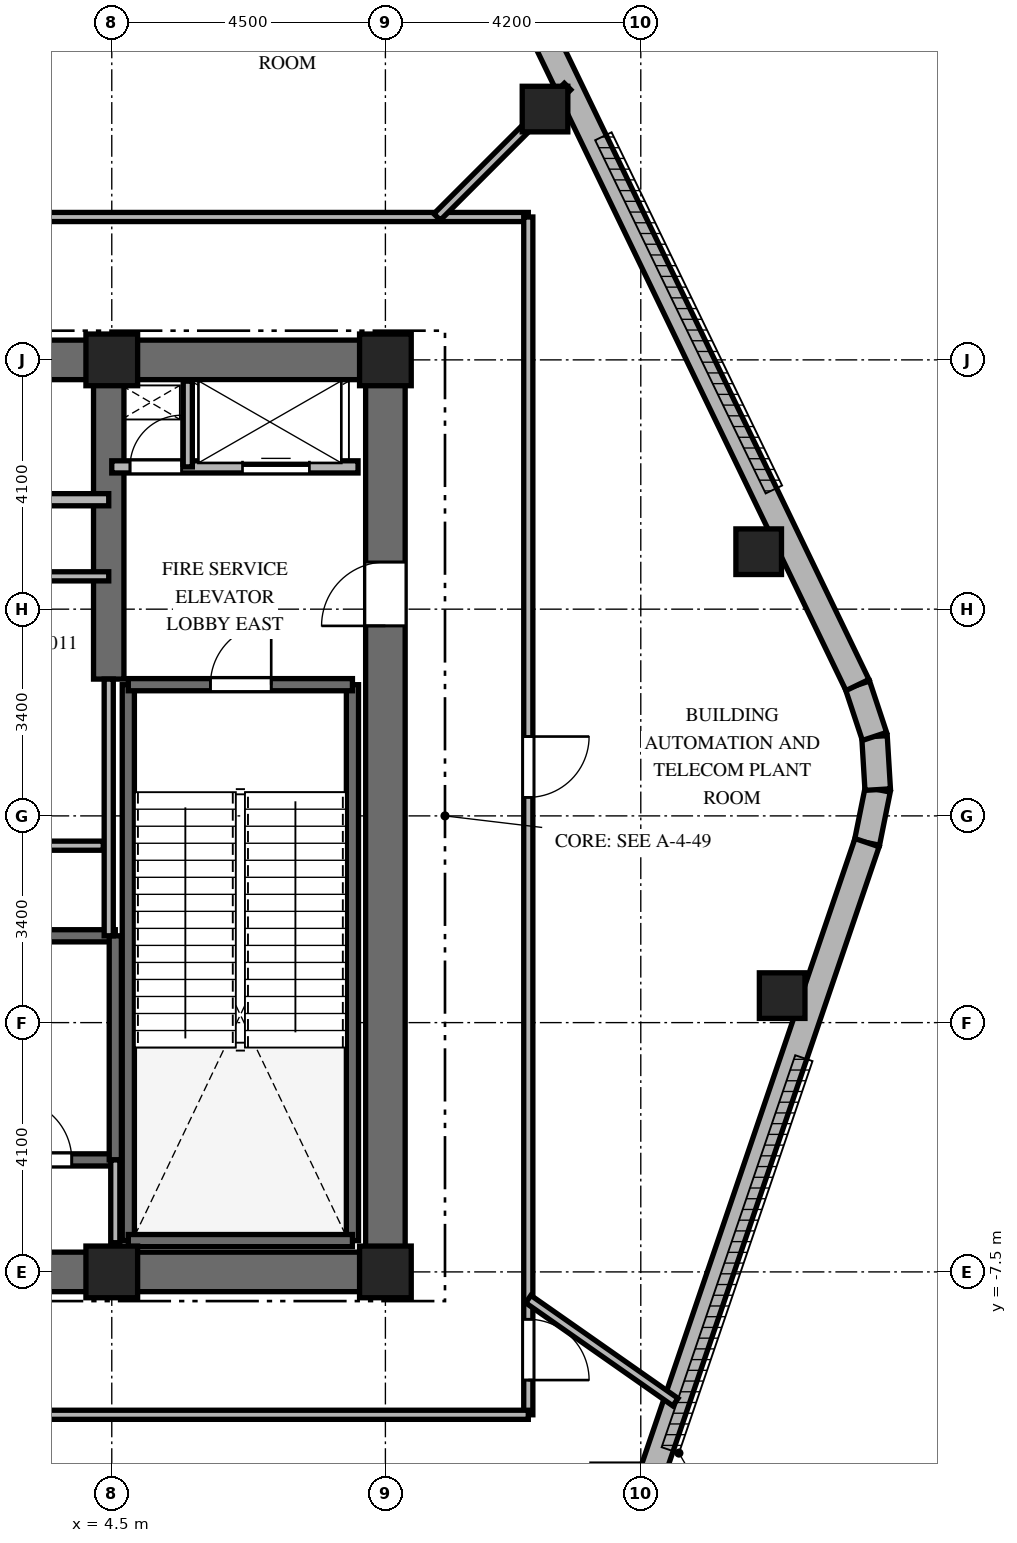
"""IFC4 building model, lengths in metres.
Left out: names, types, materials, properties, quantities, classifications, styles, units other than length and angle.
Written with IfcOpenShell. Run it as: python <this file> out.ifc"""

import sys

from ifc_helpers import new_model, si_unit, direction, frame, frame_2d, origin, origin_2d, place, context, subcontext, project, spatial, rectangle, extrude, element, fill, save


model = new_model("IFC4")
c1 = context("Model", 3, precision=1e-05, world=origin(), true_north=direction((0.0, 1.0)))
c2 = subcontext(c1, "Body", "Model", "MODEL_VIEW")
j1 = project(units=[si_unit("LENGTHUNIT", "METRE"), si_unit("PLANEANGLEUNIT", "RADIAN")], contexts=[c1])
p1 = place(None, origin())
s1 = spatial("IfcSite", under=j1, at=p1, CompositionType="ELEMENT")
p2 = place(p1, origin())
s2 = spatial("IfcBuilding", under=s1, at=p2, CompositionType="ELEMENT")
p3 = place(p2, frame((0.0, 0.0, 310.4)))
s3 = spatial("IfcBuildingStorey", under=s2, at=p3, CompositionType="ELEMENT", Elevation=310.4)
p4 = place(p3, frame((-9.325, -7.5, 0.0), z_axis=(0.0, 0.0, 1.0), x_axis=(1.0, 0.0, 0.0)))
e1 = element("IfcWall", 1, at=p4, inside=s3, PredefinedType="SHEAR", context=c2, shape_type="SweptSolid", body=[
    extrude(rectangle(XDim=18.65, YDim=0.65, at=frame_2d((9.325, 0.0))), origin(), (0.0, 0.0, 1.0), 5.5),
])
p5 = place(p4, frame((9.375, 0.0, 0.0)))
e2 = element("IfcOpeningElement", 2, at=p5, cuts=e1, PredefinedType="OPENING", context=c2, shape_type="SweptSolid", body=[
    extrude(rectangle(XDim=1.0, YDim=2.15, at=frame_2d((0.5, 1.075))), frame((0.0, 0.335, 0.0), z_axis=(0.0, -1.0, 0.0), x_axis=(1.0, 0.0, 0.0)), (0.0, 0.0, 1.0), 0.67),
])
p6 = place(p3, frame((1.85, 7.5, 0.0), z_axis=(0.0, 0.0, 1.0), x_axis=(1.0, 0.0, 0.0)))
e3 = element("IfcWall", 3, at=p6, inside=s3, PredefinedType="SHEAR", context=c2, shape_type="SweptSolid", body=[
    extrude(rectangle(XDim=7.475, YDim=0.65, at=frame_2d((3.737, 0.0))), origin(), (0.0, 0.0, 1.0), 5.5),
])
p7 = place(p3, frame((9.0, -7.175, 0.0), z_axis=(0.0, 0.0, 1.0), x_axis=(0.0, 1.0, 0.0)))
e4 = element("IfcWall", 4, at=p7, inside=s3, PredefinedType="SHEAR", context=c2, shape_type="SweptSolid", body=[
    extrude(rectangle(XDim=14.35, YDim=0.65, at=frame_2d((7.175, 0.0))), origin(), (0.0, 0.0, 1.0), 5.5),
])
p8 = place(p7, frame((10.3, 0.0, 0.0)))
e5 = element("IfcOpeningElement", 5, at=p8, cuts=e4, PredefinedType="OPENING", context=c2, shape_type="SweptSolid", body=[
    extrude(rectangle(XDim=1.05, YDim=2.15, at=frame_2d((0.525, 1.075))), frame((0.0, 0.335, 0.0), z_axis=(0.0, -1.0, 0.0), x_axis=(1.0, 0.0, 0.0)), (0.0, 0.0, 1.0), 0.67),
])
p9 = place(p3, frame((4.45, 2.25, 0.0), z_axis=(0.0, 0.0, 1.0), x_axis=(0.0, 1.0, 0.0)))
e6 = element("IfcWall", 6, at=p9, inside=s3, PredefinedType="SHEAR", context=c2, shape_type="SweptSolid", body=[
    extrude(rectangle(XDim=4.925, YDim=0.5, at=frame_2d((2.462, 0.0))), origin(), (0.0, 0.0, 1.0), 5.5),
])
for number, where, z_axis, x_axis in (
    (7, (4.772, -6.985, 0.0), (0.0, 0.0, 1.0), (0.0, 1.0, 0.0)),
    (8, (8.458, -6.985, 0.0), (0.0, 0.0, 1.0), (0.0, 1.0, 0.0)),
):
    element("IfcWall", number, at=place(p3, frame(where, z_axis=z_axis, x_axis=x_axis)), inside=s3, PredefinedType="SHEAR", context=c2, shape_type="SweptSolid", body=[
        extrude(rectangle(XDim=9.143, YDim=0.2, at=frame_2d((4.572, 0.0))), origin(), (0.0, 0.0, 1.0), 5.5),
    ])
p10 = place(p3, frame((4.772, -6.985, 0.0), z_axis=(0.0, 0.0, 1.0), x_axis=(1.0, 0.0, 0.0)))
e9 = element("IfcWall", 9, at=p10, inside=s3, PredefinedType="SHEAR", context=c2, shape_type="SweptSolid", body=[
    extrude(rectangle(XDim=3.686, YDim=0.2, at=frame_2d((1.843, 0.0))), origin(), (0.0, 0.0, 1.0), 5.5),
])
p11 = place(p3, frame((4.772, 2.158, 0.0), z_axis=(0.0, 0.0, 1.0), x_axis=(1.0, 0.0, 0.0)))
e10 = element("IfcWall", 10, at=p11, inside=s3, PredefinedType="SHEAR", context=c2, shape_type="SweptSolid", body=[
    extrude(rectangle(XDim=3.686, YDim=0.2, at=frame_2d((1.843, 0.0))), origin(), (0.0, 0.0, 1.0), 5.5),
])
p12 = place(p11, frame((1.35, 0.0, 0.0)))
e11 = element("IfcOpeningElement", 11, at=p12, cuts=e10, PredefinedType="OPENING", context=c2, shape_type="SweptSolid", body=[
    extrude(rectangle(XDim=1.0, YDim=2.15, at=frame_2d((0.5, 1.075))), frame((0.0, 0.11, 0.0), z_axis=(0.0, -1.0, 0.0), x_axis=(1.0, 0.0, 0.0)), (0.0, 0.0, 1.0), 0.22),
])
p13 = place(p3, frame((-4.608, -5.658, 0.0), z_axis=(0.0, 0.0, 1.0), x_axis=(1.0, 0.0, 0.0)))
e12 = element("IfcWall", 12, at=p13, inside=s3, PredefinedType="SHEAR", context=c2, shape_type="SweptSolid", body=[
    extrude(rectangle(XDim=9.166, YDim=0.2, at=frame_2d((4.583, 0.0))), origin(), (0.0, 0.0, 1.0), 5.5),
])
p14 = place(p13, frame((7.45, 0.0, 0.0)))
e13 = element("IfcOpeningElement", 13, at=p14, cuts=e12, PredefinedType="OPENING", context=c2, shape_type="SweptSolid", body=[
    extrude(rectangle(XDim=1.0, YDim=2.15, at=frame_2d((0.5, 1.075))), frame((0.0, 0.11, 0.0), z_axis=(0.0, -1.0, 0.0), x_axis=(1.0, 0.0, 0.0)), (0.0, 0.0, 1.0), 0.22),
])
p15 = place(p3, frame((-4.608, -1.972, 0.0), z_axis=(0.0, 0.0, 1.0), x_axis=(1.0, 0.0, 0.0)))
e14 = element("IfcWall", 14, at=p15, inside=s3, PredefinedType="SHEAR", context=c2, shape_type="SweptSolid", body=[
    extrude(rectangle(XDim=9.166, YDim=0.2, at=frame_2d((4.583, 0.0))), origin(), (0.0, 0.0, 1.0), 5.5),
])
p16 = place(p3, frame((4.558, -5.658, 0.0), z_axis=(0.0, 0.0, 1.0), x_axis=(0.0, 1.0, 0.0)))
e15 = element("IfcWall", 15, at=p16, inside=s3, PredefinedType="SHEAR", context=c2, shape_type="SweptSolid", body=[
    extrude(rectangle(XDim=3.686, YDim=0.2, at=frame_2d((1.843, 0.0))), origin(), (0.0, 0.0, 1.0), 5.5),
])
for number, where, z_axis, x_axis in (
    (16, (4.5, -7.5, 0.0), (0.0, 0.0, 1.0), (1.0, 0.0, 0.0)),
    (17, (9.0, -7.5, 0.0), (0.0, 0.0, 1.0), (1.0, 0.0, 0.0)),
    (18, (9.0, 7.5, 0.0), (0.0, 0.0, 1.0), (1.0, 0.0, 0.0)),
    (19, (4.5, 7.5, 0.0), (0.0, 0.0, 1.0), (1.0, 0.0, 0.0)),
):
    element("IfcColumn", number, at=place(p3, frame(where, z_axis=z_axis, x_axis=x_axis)), inside=s3, PredefinedType="COLUMN", context=c2, shape_type="SweptSolid", body=[
        extrude(rectangle(XDim=0.85, YDim=0.85, at=origin_2d()), origin(), (0.0, 0.0, 1.0), 5.5),
    ])
for number, where, z_axis, x_axis in (
    (20, (15.525, -2.956, 0.0), (0.0, 0.0, 1.0), (1.0, 0.0, 0.0)),
    (21, (15.139, 4.345, 0.0), (0.0, 0.0, 1.0), (1.0, 0.0, 0.0)),
    (22, (11.625, 11.625, 0.0), (0.0, 0.0, 1.0), (1.0, 0.0, 0.0)),
):
    element("IfcColumn", number, at=place(p3, frame(where, z_axis=z_axis, x_axis=x_axis)), inside=s3, PredefinedType="COLUMN", context=c2, shape_type="SweptSolid", body=[
        extrude(rectangle(XDim=0.75, YDim=0.75, at=origin_2d()), origin(), (0.0, 0.0, 1.0), 5.5),
    ])
p17 = place(p3, frame((16.921, -0.44, 0.0), z_axis=(0.0, 0.0, 1.0), x_axis=(0.197170749138, 0.980369162961, 0.0)))
e23 = element("IfcWall", 23, at=p17, inside=s3, PredefinedType="SOLIDWALL", context=c2, shape_type="SweptSolid", body=[
    extrude(rectangle(XDim=0.89, YDim=0.42, at=frame_2d((0.445, 0.0))), origin(), (0.0, 0.0, 1.0), 5.18),
])
p18 = place(p3, frame((17.096, 0.433, 0.0), z_axis=(0.0, 0.0, 1.0), x_axis=(-0.060469820114, 0.998170026025, 0.0)))
e24 = element("IfcWall", 24, at=p18, inside=s3, PredefinedType="SOLIDWALL", context=c2, shape_type="SweptSolid", body=[
    extrude(rectangle(XDim=0.876, YDim=0.42, at=frame_2d((0.438, 0.0))), origin(), (0.0, 0.0, 1.0), 5.18),
])
p19 = place(p3, frame((17.043, 1.307, 0.0), z_axis=(0.0, 0.0, 1.0), x_axis=(-0.314581701602, 0.949230400386, 0.0)))
e25 = element("IfcWall", 25, at=p19, inside=s3, PredefinedType="SOLIDWALL", context=c2, shape_type="SweptSolid", body=[
    extrude(rectangle(XDim=0.89, YDim=0.42, at=frame_2d((0.445, 0.0))), origin(), (0.0, 0.0, 1.0), 5.18),
])
p20 = place(p3, frame((12.344, -13.873, 0.0), z_axis=(0.0, 0.0, 1.0), x_axis=(0.322553427155, 0.946551259378, 0.0)))
e26 = element("IfcWall", 26, at=p20, inside=s3, PredefinedType="SOLIDWALL", context=c2, shape_type="SweptSolid", body=[
    extrude(rectangle(XDim=14.191, YDim=0.42, at=frame_2d((7.096, 0.0))), origin(), (0.0, 0.0, 1.0), 5.18),
])
p21 = place(p3, frame((16.763, 2.152, 0.0), z_axis=(0.0, 0.0, 1.0), x_axis=(-0.434664735238, 0.900592342817, 0.0)))
e27 = element("IfcWall", 27, at=p21, inside=s3, PredefinedType="SOLIDWALL", context=c2, shape_type="SweptSolid", body=[
    extrude(rectangle(XDim=13.44, YDim=0.42, at=frame_2d((6.72, 0.0))), origin(), (0.0, 0.0, 1.0), 5.18),
])
p22 = place(p3, frame((4.558, -7.02, 0.0), z_axis=(0.0, 0.0, 1.0), x_axis=(0.0, 1.0, 0.0)))
e28 = element("IfcWall", 28, at=p22, inside=s3, PredefinedType="PARTITIONING", context=c2, shape_type="SweptSolid", body=[
    extrude(rectangle(XDim=1.362, YDim=0.15, at=frame_2d((0.681, 0.0))), origin(), (0.0, 0.0, 1.0), 5.18),
])
p23 = place(p3, frame((4.5, 5.74, 0.0), z_axis=(0.0, 0.0, 1.0), x_axis=(1.0, 0.0, 0.0)))
e29 = element("IfcWall", 29, at=p23, inside=s3, PredefinedType="PARTITIONING", context=c2, shape_type="SweptSolid", body=[
    extrude(rectangle(XDim=4.05, YDim=0.2, at=frame_2d((2.025, 0.0))), origin(), (0.0, 0.0, 1.0), 5.18),
])
p24 = place(p23, frame((0.3, 0.0, 0.0)))
e30 = element("IfcOpeningElement", 30, at=p24, cuts=e29, PredefinedType="OPENING", context=c2, shape_type="SweptSolid", body=[
    extrude(rectangle(XDim=0.85, YDim=2.03, at=frame_2d((0.425, 1.015))), frame((0.0, 0.11, 0.0), z_axis=(0.0, -1.0, 0.0), x_axis=(1.0, 0.0, 0.0)), (0.0, 0.0, 1.0), 0.22),
])
p25 = place(p23, frame((2.15, 0.0, 0.0)))
e31 = element("IfcOpeningElement", 31, at=p25, cuts=e29, PredefinedType="OPENING", context=c2, shape_type="SweptSolid", body=[
    extrude(rectangle(XDim=1.1, YDim=2.2, at=frame_2d((0.55, 1.1))), frame((0.0, 0.11, 0.0), z_axis=(0.0, -1.0, 0.0), x_axis=(1.0, 0.0, 0.0)), (0.0, 0.0, 1.0), 0.22),
])
p26 = place(p3, frame((5.75, 5.74, 0.0), z_axis=(0.0, 0.0, 1.0), x_axis=(0.0, 1.0, 0.0)))
e32 = element("IfcWall", 32, at=p26, inside=s3, PredefinedType="PARTITIONING", context=c2, shape_type="SweptSolid", body=[
    extrude(rectangle(XDim=1.41, YDim=0.15, at=frame_2d((0.705, 0.0))), origin(), (0.0, 0.0, 1.0), 5.18),
])
p27 = place(p3, frame((1.85, 5.2, 0.0), z_axis=(0.0, 0.0, 1.0), x_axis=(1.0, 0.0, 0.0)))
e33 = element("IfcWall", 33, at=p27, inside=s3, PredefinedType="PARTITIONING", context=c2, shape_type="SweptSolid", body=[
    extrude(rectangle(XDim=2.6, YDim=0.2, at=frame_2d((1.3, 0.0))), origin(), (0.0, 0.0, 1.0), 5.18),
])
p28 = place(p3, frame((4.45, -1.972, 0.0), z_axis=(0.0, 0.0, 1.0), x_axis=(0.0, 1.0, 0.0)))
e34 = element("IfcWall", 34, at=p28, inside=s3, PredefinedType="PARTITIONING", context=c2, shape_type="SweptSolid", body=[
    extrude(rectangle(XDim=4.222, YDim=0.15, at=frame_2d((2.111, 0.0))), origin(), (0.0, 0.0, 1.0), 5.18),
])
p29 = place(p3, frame((1.9, 3.94, 0.0), z_axis=(0.0, 0.0, 1.0), x_axis=(1.0, 0.0, 0.0)))
e35 = element("IfcWall", 35, at=p29, inside=s3, PredefinedType="PARTITIONING", context=c2, shape_type="SweptSolid", body=[
    extrude(rectangle(XDim=2.55, YDim=0.15, at=frame_2d((1.275, 0.0))), origin(), (0.0, 0.0, 1.0), 5.18),
])
p30 = place(p3, frame((-4.36, -0.49, 0.0), z_axis=(0.0, 0.0, 1.0), x_axis=(1.0, 0.0, 0.0)))
e36 = element("IfcWall", 36, at=p30, inside=s3, PredefinedType="PARTITIONING", context=c2, shape_type="SweptSolid", body=[
    extrude(rectangle(XDim=8.72, YDim=0.15, at=frame_2d((4.36, 0.0))), origin(), (0.0, 0.0, 1.0), 5.18),
])
p31 = place(p30, frame((3.86, 0.0, 0.0)))
e37 = element("IfcOpeningElement", 37, at=p31, cuts=e36, PredefinedType="OPENING", context=c2, shape_type="SweptSolid", body=[
    extrude(rectangle(XDim=0.9, YDim=2.03, at=frame_2d((0.45, 1.015))), frame((0.0, 0.085, 0.0), z_axis=(0.0, -1.0, 0.0), x_axis=(1.0, 0.0, 0.0)), (0.0, 0.0, 1.0), 0.17),
])
p32 = place(p3, frame((-11.35, 9.85, 0.0), z_axis=(0.0, 0.0, 1.0), x_axis=(1.0, 0.0, 0.0)))
e38 = element("IfcWall", 38, at=p32, inside=s3, PredefinedType="PARTITIONING", context=c2, shape_type="SweptSolid", body=[
    extrude(rectangle(XDim=22.7, YDim=0.15, at=frame_2d((11.35, 0.0))), origin(), (0.0, 0.0, 1.0), 4.67),
])
p33 = place(p32, frame((13.516, 0.0, 0.0)))
e39 = element("IfcOpeningElement", 39, at=p33, cuts=e38, PredefinedType="OPENING", context=c2, shape_type="SweptSolid", body=[
    extrude(rectangle(XDim=1.0, YDim=2.15, at=frame_2d((0.5, 1.075))), frame((0.0, 0.085, 0.0), z_axis=(0.0, -1.0, 0.0), x_axis=(1.0, 0.0, 0.0)), (0.0, 0.0, 1.0), 0.17),
])
p34 = place(p3, frame((11.35, 9.85, 0.0), z_axis=(0.0, 0.0, 1.0), x_axis=(0.0, -1.0, 0.0)))
e40 = element("IfcWall", 40, at=p34, inside=s3, PredefinedType="PARTITIONING", context=c2, shape_type="SweptSolid", body=[
    extrude(rectangle(XDim=19.7, YDim=0.15, at=frame_2d((9.85, 0.0))), origin(), (0.0, 0.0, 1.0), 4.67),
])
p35 = place(p34, frame((18.129, 0.0, 0.0)))
e41 = element("IfcOpeningElement", 41, at=p35, cuts=e40, PredefinedType="OPENING", context=c2, shape_type="SweptSolid", body=[
    extrude(rectangle(XDim=1.0, YDim=2.15, at=frame_2d((0.5, 1.075))), frame((0.0, 0.085, 0.0), z_axis=(0.0, -1.0, 0.0), x_axis=(1.0, 0.0, 0.0)), (0.0, 0.0, 1.0), 0.17),
])
p36 = place(p34, frame((8.545, 0.0, 0.0)))
e42 = element("IfcOpeningElement", 42, at=p36, cuts=e40, PredefinedType="OPENING", context=c2, shape_type="SweptSolid", body=[
    extrude(rectangle(XDim=1.0, YDim=2.15, at=frame_2d((0.5, 1.075))), frame((0.0, 0.085, 0.0), z_axis=(0.0, -1.0, 0.0), x_axis=(1.0, 0.0, 0.0)), (0.0, 0.0, 1.0), 0.17),
])
p37 = place(p3, frame((11.35, -9.85, 0.0), z_axis=(0.0, 0.0, 1.0), x_axis=(-1.0, 0.0, 0.0)))
e43 = element("IfcWall", 43, at=p37, inside=s3, PredefinedType="PARTITIONING", context=c2, shape_type="SweptSolid", body=[
    extrude(rectangle(XDim=22.7, YDim=0.15, at=frame_2d((11.35, 0.0))), origin(), (0.0, 0.0, 1.0), 4.67),
])
p38 = place(p3, frame((9.85, 9.85, 0.0), z_axis=(0.0, 0.0, 1.0), x_axis=(0.707106781187, 0.707106781187, 0.0)))
e44 = element("IfcWall", 44, at=p38, inside=s3, PredefinedType="PARTITIONING", context=c2, shape_type="SweptSolid", body=[
    extrude(rectangle(XDim=3.035, YDim=0.15, at=frame_2d((1.517, 0.0))), origin(), (0.0, 0.0, 1.0), 4.52),
])
p39 = place(p3, frame((11.35, -7.948, 0.0), z_axis=(0.0, 0.0, 1.0), x_axis=(0.819127049933, -0.573612130335, 0.0)))
e45 = element("IfcWall", 45, at=p39, inside=s3, PredefinedType="PARTITIONING", context=c2, shape_type="SweptSolid", body=[
    extrude(rectangle(XDim=2.953, YDim=0.15, at=frame_2d((1.477, 0.0))), origin(), (0.0, 0.0, 1.0), 4.52),
])
p40 = place(p12, origin())
e46 = element("IfcDoor", 46, at=p40, inside=s3, OperationType="SINGLE_SWING_RIGHT", PredefinedType="DOOR", context=c2, shape_type="SweptSolid", body=[
    extrude(rectangle(XDim=1.0, YDim=2.15, at=frame_2d((0.5, 1.075))), frame((0.0, 0.025, 0.0), z_axis=(0.0, -1.0, 0.0), x_axis=(1.0, 0.0, 0.0)), (0.0, 0.0, 1.0), 0.05),
])
fill(e11, e46)
p41 = place(p14, origin())
e47 = element("IfcDoor", 47, at=p41, inside=s3, OperationType="SINGLE_SWING_LEFT", PredefinedType="DOOR", context=c2, shape_type="SweptSolid", body=[
    extrude(rectangle(XDim=1.0, YDim=2.15, at=frame_2d((0.5, 1.075))), frame((0.0, 0.025, 0.0), z_axis=(0.0, -1.0, 0.0), x_axis=(1.0, 0.0, 0.0)), (0.0, 0.0, 1.0), 0.05),
])
fill(e13, e47)
p42 = place(p8, origin())
e48 = element("IfcDoor", 48, at=p42, inside=s3, OperationType="SINGLE_SWING_LEFT", PredefinedType="DOOR", context=c2, shape_type="SweptSolid", body=[
    extrude(rectangle(XDim=1.05, YDim=2.15, at=frame_2d((0.525, 1.075))), frame((0.0, 0.025, 0.0), z_axis=(0.0, -1.0, 0.0), x_axis=(1.0, 0.0, 0.0)), (0.0, 0.0, 1.0), 0.05),
])
fill(e5, e48)
p43 = place(p24, origin())
e49 = element("IfcDoor", 49, at=p43, inside=s3, OperationType="SINGLE_SWING_RIGHT", PredefinedType="DOOR", context=c2, shape_type="SweptSolid", body=[
    extrude(rectangle(XDim=0.85, YDim=2.03, at=frame_2d((0.425, 1.015))), frame((0.0, 0.025, 0.0), z_axis=(0.0, -1.0, 0.0), x_axis=(1.0, 0.0, 0.0)), (0.0, 0.0, 1.0), 0.05),
])
fill(e30, e49)
p44 = place(p25, origin())
e50 = element("IfcDoor", 50, at=p44, inside=s3, OperationType="SLIDING_TO_RIGHT", PredefinedType="DOOR", context=c2, shape_type="SweptSolid", body=[
    extrude(rectangle(XDim=1.1, YDim=2.2, at=frame_2d((0.55, 1.1))), frame((0.0, 0.025, 0.0), z_axis=(0.0, -1.0, 0.0), x_axis=(1.0, 0.0, 0.0)), (0.0, 0.0, 1.0), 0.05),
])
fill(e31, e50)
p45 = place(p35, origin())
e51 = element("IfcDoor", 51, at=p45, inside=s3, OperationType="SINGLE_SWING_RIGHT", PredefinedType="DOOR", context=c2, shape_type="SweptSolid", body=[
    extrude(rectangle(XDim=1.0, YDim=2.15, at=frame_2d((0.5, 1.075))), frame((0.0, 0.025, 0.0), z_axis=(0.0, -1.0, 0.0), x_axis=(1.0, 0.0, 0.0)), (0.0, 0.0, 1.0), 0.05),
])
fill(e41, e51)
p46 = place(p36, origin())
e52 = element("IfcDoor", 52, at=p46, inside=s3, OperationType="SINGLE_SWING_LEFT", PredefinedType="DOOR", context=c2, shape_type="SweptSolid", body=[
    extrude(rectangle(XDim=1.0, YDim=2.15, at=frame_2d((0.5, 1.075))), frame((0.0, 0.025, 0.0), z_axis=(0.0, -1.0, 0.0), x_axis=(1.0, 0.0, 0.0)), (0.0, 0.0, 1.0), 0.05),
])
fill(e42, e52)
save(model, sys.argv[1])
